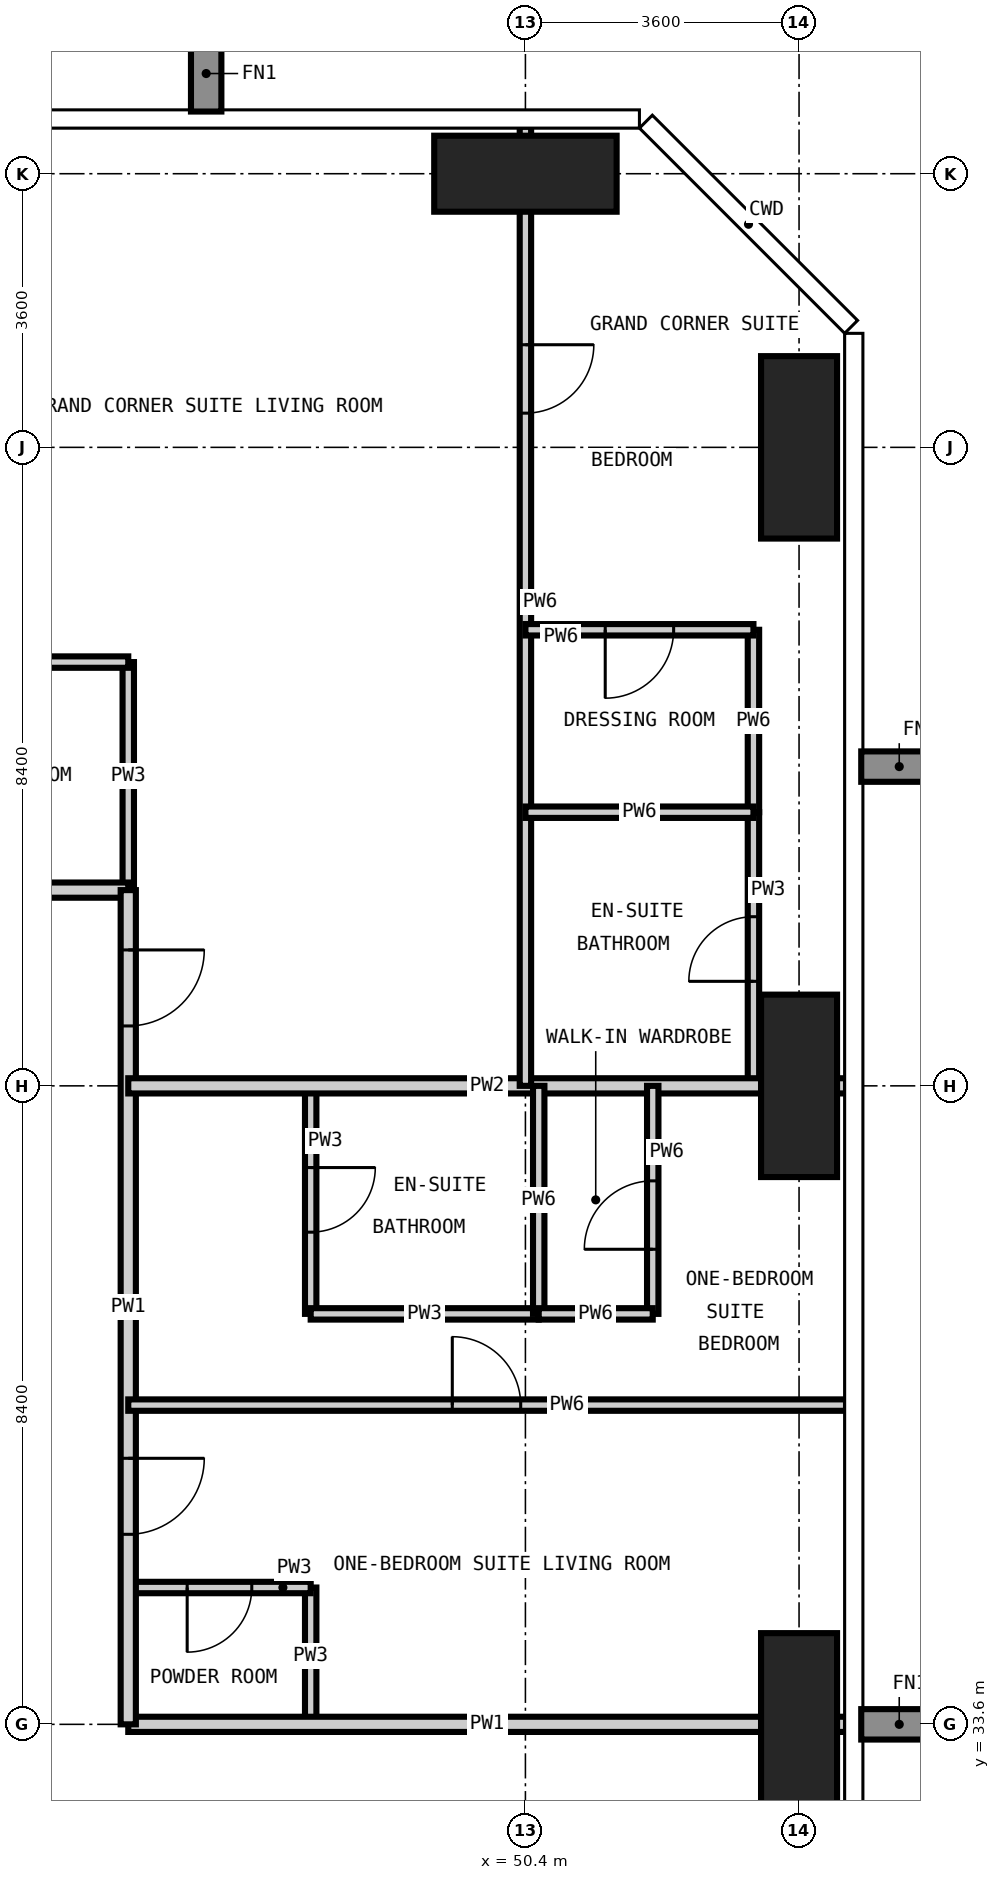
"""IFC4 building model, lengths in metres.
Left out: names, types, materials, properties, quantities, classifications, styles, units other than length and angle.
Written with IfcOpenShell. Run it as: python <this file> out.ifc"""

import sys

from ifc_helpers import new_model, si_unit, direction, frame, frame_2d, origin, origin_2d, place, context, subcontext, project, spatial, rectangle, extrude, element, fill, save


model = new_model("IFC4")
c1 = context("Model", 3, precision=1e-05, world=origin(), true_north=direction((0.0, 1.0)))
c2 = subcontext(c1, "Body", "Model", "MODEL_VIEW")
j1 = project(units=[si_unit("LENGTHUNIT", "METRE"), si_unit("PLANEANGLEUNIT", "RADIAN")], contexts=[c1])
p1 = place(None, origin())
s1 = spatial("IfcSite", under=j1, at=p1, CompositionType="ELEMENT")
p2 = place(p1, origin())
s2 = spatial("IfcBuilding", under=s1, at=p2, CompositionType="ELEMENT")
p3 = place(p2, frame((0.0, 0.0, 237.3)))
s3 = spatial("IfcBuildingStorey", under=s2, at=p3, CompositionType="ELEMENT", Elevation=237.3)
p4 = place(p3, frame((50.4, 54.0, -0.35), z_axis=(0.0, 0.0, 1.0), x_axis=(1.0, 0.0, 0.0)))
e1 = element("IfcColumn", 1, at=p4, inside=s3, PredefinedType="COLUMN", context=c2, shape_type="SweptSolid", body=[
    extrude(rectangle(XDim=2.4, YDim=1.0, at=origin_2d()), origin(), (0.0, 0.0, 1.0), 3.9),
])
for number, where, z_axis, x_axis in (
    (2, (54.0, 33.6, -0.35), (0.0, 0.0, 1.0), (1.0, 0.0, 0.0)),
    (3, (54.0, 42.0, -0.35), (0.0, 0.0, 1.0), (1.0, 0.0, 0.0)),
    (4, (54.0, 50.4, -0.35), (0.0, 0.0, 1.0), (1.0, 0.0, 0.0)),
):
    element("IfcColumn", number, at=place(p3, frame(where, z_axis=z_axis, x_axis=x_axis)), inside=s3, PredefinedType="COLUMN", context=c2, shape_type="SweptSolid", body=[
        extrude(rectangle(XDim=1.0, YDim=2.4, at=origin_2d()), origin(), (0.0, 0.0, 1.0), 3.9),
    ])
p5 = place(p3, frame((45.175, 44.575, 0.0), z_axis=(0.0, 0.0, 1.0), x_axis=(0.0, 1.0, 0.0)))
e5 = element("IfcWall", 5, at=p5, inside=s3, PredefinedType="PARTITIONING", context=c2, shape_type="SweptSolid", body=[
    extrude(rectangle(XDim=3.0, YDim=0.15, at=frame_2d((1.5, 0.0))), origin(), (0.0, 0.0, 1.0), 3.55),
])
p6 = place(p3, frame((47.575, 33.6, 0.0), z_axis=(0.0, 0.0, 1.0), x_axis=(0.0, 1.0, 0.0)))
e6 = element("IfcWall", 6, at=p6, inside=s3, PredefinedType="PARTITIONING", context=c2, shape_type="SweptSolid", body=[
    extrude(rectangle(XDim=1.8, YDim=0.15, at=frame_2d((0.9, 0.0))), origin(), (0.0, 0.0, 1.0), 3.55),
])
p7 = place(p3, frame((47.575, 39.0, 0.0), z_axis=(0.0, 0.0, 1.0), x_axis=(0.0, 1.0, 0.0)))
e7 = element("IfcWall", 7, at=p7, inside=s3, PredefinedType="PARTITIONING", context=c2, shape_type="SweptSolid", body=[
    extrude(rectangle(XDim=3.0, YDim=0.15, at=frame_2d((1.5, 0.0))), origin(), (0.0, 0.0, 1.0), 3.55),
])
p8 = place(p7, frame((1.075, 0.0, 0.0)))
e8 = element("IfcOpeningElement", 8, at=p8, cuts=e7, PredefinedType="OPENING", context=c2, shape_type="SweptSolid", body=[
    extrude(rectangle(XDim=0.85, YDim=2.1, at=frame_2d((0.425, 1.05))), frame((0.0, 0.085, 0.0), z_axis=(0.0, -1.0, 0.0), x_axis=(1.0, 0.0, 0.0)), (0.0, 0.0, 1.0), 0.17),
])
p9 = place(p3, frame((53.4, 42.0, 0.0), z_axis=(0.0, 0.0, 1.0), x_axis=(0.0, 1.0, 0.0)))
e9 = element("IfcWall", 9, at=p9, inside=s3, PredefinedType="PARTITIONING", context=c2, shape_type="SweptSolid", body=[
    extrude(rectangle(XDim=3.6, YDim=0.15, at=frame_2d((1.8, 0.0))), origin(), (0.0, 0.0, 1.0), 3.55),
])
p10 = place(p9, frame((1.375, 0.0, 0.0)))
e10 = element("IfcOpeningElement", 10, at=p10, cuts=e9, PredefinedType="OPENING", context=c2, shape_type="SweptSolid", body=[
    extrude(rectangle(XDim=0.85, YDim=2.1, at=frame_2d((0.425, 1.05))), frame((0.0, 0.085, 0.0), z_axis=(0.0, -1.0, 0.0), x_axis=(1.0, 0.0, 0.0)), (0.0, 0.0, 1.0), 0.17),
])
p11 = place(p3, frame((45.175, 35.4, 0.0), z_axis=(0.0, 0.0, 1.0), x_axis=(1.0, 0.0, 0.0)))
e11 = element("IfcWall", 11, at=p11, inside=s3, PredefinedType="PARTITIONING", context=c2, shape_type="SweptSolid", body=[
    extrude(rectangle(XDim=2.4, YDim=0.15, at=frame_2d((1.2, 0.0))), origin(), (0.0, 0.0, 1.0), 3.55),
])
p12 = place(p11, frame((0.775, 0.0, 0.0)))
e12 = element("IfcOpeningElement", 12, at=p12, cuts=e11, PredefinedType="OPENING", context=c2, shape_type="SweptSolid", body=[
    extrude(rectangle(XDim=0.85, YDim=2.1, at=frame_2d((0.425, 1.05))), frame((0.0, 0.085, 0.0), z_axis=(0.0, -1.0, 0.0), x_axis=(1.0, 0.0, 0.0)), (0.0, 0.0, 1.0), 0.17),
])
p13 = place(p3, frame((47.575, 39.0, 0.0), z_axis=(0.0, 0.0, 1.0), x_axis=(1.0, 0.0, 0.0)))
e13 = element("IfcWall", 13, at=p13, inside=s3, PredefinedType="PARTITIONING", context=c2, shape_type="SweptSolid", body=[
    extrude(rectangle(XDim=3.0, YDim=0.15, at=frame_2d((1.5, 0.0))), origin(), (0.0, 0.0, 1.0), 3.55),
])
p14 = place(p3, frame((42.0, 47.575, 0.0), z_axis=(0.0, 0.0, 1.0), x_axis=(1.0, 0.0, 0.0)))
e14 = element("IfcWall", 14, at=p14, inside=s3, PredefinedType="PARTITIONING", context=c2, shape_type="SweptSolid", body=[
    extrude(rectangle(XDim=3.175, YDim=0.15, at=frame_2d((1.587, 0.0))), origin(), (0.0, 0.0, 1.0), 3.55),
])
p15 = place(p14, frame((1.163, 0.0, 0.0)))
e15 = element("IfcOpeningElement", 15, at=p15, cuts=e14, PredefinedType="OPENING", context=c2, shape_type="SweptSolid", body=[
    extrude(rectangle(XDim=0.85, YDim=2.1, at=frame_2d((0.425, 1.05))), frame((0.0, 0.085, 0.0), z_axis=(0.0, -1.0, 0.0), x_axis=(1.0, 0.0, 0.0)), (0.0, 0.0, 1.0), 0.17),
])
p16 = place(p3, frame((45.175, 33.6, 0.0), z_axis=(0.0, 0.0, 1.0), x_axis=(1.0, 0.0, 0.0)))
e16 = element("IfcWall", 16, at=p16, inside=s3, PredefinedType="PARTITIONING", context=c2, shape_type="SweptSolid", body=[
    extrude(rectangle(XDim=9.443, YDim=0.2, at=frame_2d((4.721, 0.0))), origin(), (0.0, 0.0, 1.0), 3.55),
])
p17 = place(p3, frame((22.325, 44.575, 0.0), z_axis=(0.0, 0.0, 1.0), x_axis=(1.0, 0.0, 0.0)))
e17 = element("IfcWall", 17, at=p17, inside=s3, PredefinedType="PARTITIONING", context=c2, shape_type="SweptSolid", body=[
    extrude(rectangle(XDim=22.85, YDim=0.2, at=frame_2d((11.425, 0.0))), origin(), (0.0, 0.0, 1.0), 3.55),
])
p18 = place(p17, frame((6.575, 0.0, 0.0)))
e18 = element("IfcOpeningElement", 18, at=p18, cuts=e17, PredefinedType="OPENING", context=c2, shape_type="SweptSolid", body=[
    extrude(rectangle(XDim=1.0, YDim=2.2, at=frame_2d((0.5, 1.1))), frame((0.0, 0.11, 0.0), z_axis=(0.0, -1.0, 0.0), x_axis=(1.0, 0.0, 0.0)), (0.0, 0.0, 1.0), 0.22),
])
p19 = place(p17, frame((14.975, 0.0, 0.0)))
e19 = element("IfcOpeningElement", 19, at=p19, cuts=e17, PredefinedType="OPENING", context=c2, shape_type="SweptSolid", body=[
    extrude(rectangle(XDim=1.0, YDim=2.2, at=frame_2d((0.5, 1.1))), frame((0.0, 0.11, 0.0), z_axis=(0.0, -1.0, 0.0), x_axis=(1.0, 0.0, 0.0)), (0.0, 0.0, 1.0), 0.22),
])
p20 = place(p3, frame((45.175, 44.575, 0.0), z_axis=(0.0, 0.0, 1.0), x_axis=(0.0, -1.0, 0.0)))
e20 = element("IfcWall", 20, at=p20, inside=s3, PredefinedType="PARTITIONING", context=c2, shape_type="SweptSolid", body=[
    extrude(rectangle(XDim=10.975, YDim=0.2, at=frame_2d((5.487, 0.0))), origin(), (0.0, 0.0, 1.0), 3.55),
])
p21 = place(p20, frame((7.475, 0.0, 0.0)))
e21 = element("IfcOpeningElement", 21, at=p21, cuts=e20, PredefinedType="OPENING", context=c2, shape_type="SweptSolid", body=[
    extrude(rectangle(XDim=1.0, YDim=2.2, at=frame_2d((0.5, 1.1))), frame((0.0, 0.11, 0.0), z_axis=(0.0, -1.0, 0.0), x_axis=(1.0, 0.0, 0.0)), (0.0, 0.0, 1.0), 0.22),
])
p22 = place(p20, frame((0.787, 0.0, 0.0)))
e22 = element("IfcOpeningElement", 22, at=p22, cuts=e20, PredefinedType="OPENING", context=c2, shape_type="SweptSolid", body=[
    extrude(rectangle(XDim=1.0, YDim=2.2, at=frame_2d((0.5, 1.1))), frame((0.0, 0.11, 0.0), z_axis=(0.0, -1.0, 0.0), x_axis=(1.0, 0.0, 0.0)), (0.0, 0.0, 1.0), 0.22),
])
p23 = place(p3, frame((45.175, 42.0, 0.0), z_axis=(0.0, 0.0, 1.0), x_axis=(1.0, 0.0, 0.0)))
e23 = element("IfcWall", 23, at=p23, inside=s3, PredefinedType="PARTITIONING", context=c2, shape_type="SweptSolid", body=[
    extrude(rectangle(XDim=9.443, YDim=0.2, at=frame_2d((4.721, 0.0))), origin(), (0.0, 0.0, 1.0), 3.55),
])
p24 = place(p3, frame((50.4, 42.0, 0.0), z_axis=(0.0, 0.0, 1.0), x_axis=(0.0, 1.0, 0.0)))
e24 = element("IfcWall", 24, at=p24, inside=s3, PredefinedType="PARTITIONING", context=c2, shape_type="SweptSolid", body=[
    extrude(rectangle(XDim=12.618, YDim=0.15, at=frame_2d((6.309, 0.0))), origin(), (0.0, 0.0, 1.0), 3.55),
])
p25 = place(p24, frame((8.85, 0.0, 0.0)))
e25 = element("IfcOpeningElement", 25, at=p25, cuts=e24, PredefinedType="OPENING", context=c2, shape_type="SweptSolid", body=[
    extrude(rectangle(XDim=0.9, YDim=2.1, at=frame_2d((0.45, 1.05))), frame((0.0, 0.085, 0.0), z_axis=(0.0, -1.0, 0.0), x_axis=(1.0, 0.0, 0.0)), (0.0, 0.0, 1.0), 0.17),
])
p26 = place(p3, frame((50.575, 39.0, 0.0), z_axis=(0.0, 0.0, 1.0), x_axis=(0.0, 1.0, 0.0)))
e26 = element("IfcWall", 26, at=p26, inside=s3, PredefinedType="PARTITIONING", context=c2, shape_type="SweptSolid", body=[
    extrude(rectangle(XDim=3.0, YDim=0.15, at=frame_2d((1.5, 0.0))), origin(), (0.0, 0.0, 1.0), 3.55),
])
p27 = place(p3, frame((52.075, 39.0, 0.0), z_axis=(0.0, 0.0, 1.0), x_axis=(0.0, 1.0, 0.0)))
e27 = element("IfcWall", 27, at=p27, inside=s3, PredefinedType="PARTITIONING", context=c2, shape_type="SweptSolid", body=[
    extrude(rectangle(XDim=3.0, YDim=0.15, at=frame_2d((1.5, 0.0))), origin(), (0.0, 0.0, 1.0), 3.55),
])
p28 = place(p27, frame((0.85, 0.0, 0.0)))
e28 = element("IfcOpeningElement", 28, at=p28, cuts=e27, PredefinedType="OPENING", context=c2, shape_type="SweptSolid", body=[
    extrude(rectangle(XDim=0.9, YDim=2.1, at=frame_2d((0.45, 1.05))), frame((0.0, 0.085, 0.0), z_axis=(0.0, -1.0, 0.0), x_axis=(1.0, 0.0, 0.0)), (0.0, 0.0, 1.0), 0.17),
])
p29 = place(p3, frame((53.4, 45.6, 0.0), z_axis=(0.0, 0.0, 1.0), x_axis=(0.0, 1.0, 0.0)))
e29 = element("IfcWall", 29, at=p29, inside=s3, PredefinedType="PARTITIONING", context=c2, shape_type="SweptSolid", body=[
    extrude(rectangle(XDim=2.4, YDim=0.15, at=frame_2d((1.2, 0.0))), origin(), (0.0, 0.0, 1.0), 3.55),
])
p30 = place(p3, frame((45.175, 37.8, 0.0), z_axis=(0.0, 0.0, 1.0), x_axis=(1.0, 0.0, 0.0)))
e30 = element("IfcWall", 30, at=p30, inside=s3, PredefinedType="PARTITIONING", context=c2, shape_type="SweptSolid", body=[
    extrude(rectangle(XDim=9.443, YDim=0.15, at=frame_2d((4.721, 0.0))), origin(), (0.0, 0.0, 1.0), 3.55),
])
p31 = place(p30, frame((4.263, 0.0, 0.0)))
e31 = element("IfcOpeningElement", 31, at=p31, cuts=e30, PredefinedType="OPENING", context=c2, shape_type="SweptSolid", body=[
    extrude(rectangle(XDim=0.9, YDim=2.1, at=frame_2d((0.45, 1.05))), frame((0.0, 0.085, 0.0), z_axis=(0.0, -1.0, 0.0), x_axis=(1.0, 0.0, 0.0)), (0.0, 0.0, 1.0), 0.17),
])
p32 = place(p3, frame((50.575, 39.0, 0.0), z_axis=(0.0, 0.0, 1.0), x_axis=(1.0, 0.0, 0.0)))
e32 = element("IfcWall", 32, at=p32, inside=s3, PredefinedType="PARTITIONING", context=c2, shape_type="SweptSolid", body=[
    extrude(rectangle(XDim=1.5, YDim=0.15, at=frame_2d((0.75, 0.0))), origin(), (0.0, 0.0, 1.0), 3.55),
])
p33 = place(p3, frame((50.4, 45.6, 0.0), z_axis=(0.0, 0.0, 1.0), x_axis=(1.0, 0.0, 0.0)))
e33 = element("IfcWall", 33, at=p33, inside=s3, PredefinedType="PARTITIONING", context=c2, shape_type="SweptSolid", body=[
    extrude(rectangle(XDim=3.0, YDim=0.15, at=frame_2d((1.5, 0.0))), origin(), (0.0, 0.0, 1.0), 3.55),
])
p34 = place(p3, frame((50.4, 48.0, 0.0), z_axis=(0.0, 0.0, 1.0), x_axis=(1.0, 0.0, 0.0)))
e34 = element("IfcWall", 34, at=p34, inside=s3, PredefinedType="PARTITIONING", context=c2, shape_type="SweptSolid", body=[
    extrude(rectangle(XDim=3.0, YDim=0.15, at=frame_2d((1.5, 0.0))), origin(), (0.0, 0.0, 1.0), 3.55),
])
p35 = place(p34, frame((1.05, 0.0, 0.0)))
e35 = element("IfcOpeningElement", 35, at=p35, cuts=e34, PredefinedType="OPENING", context=c2, shape_type="SweptSolid", body=[
    extrude(rectangle(XDim=0.9, YDim=2.1, at=frame_2d((0.45, 1.05))), frame((0.0, 0.085, 0.0), z_axis=(0.0, -1.0, 0.0), x_axis=(1.0, 0.0, 0.0)), (0.0, 0.0, 1.0), 0.17),
])
p36 = place(p21, origin())
e36 = element("IfcDoor", 36, at=p36, inside=s3, OperationType="SINGLE_SWING_LEFT", PredefinedType="DOOR", context=c2, shape_type="SweptSolid", body=[
    extrude(rectangle(XDim=1.0, YDim=2.2, at=frame_2d((0.5, 1.1))), frame((0.0, 0.025, 0.0), z_axis=(0.0, -1.0, 0.0), x_axis=(1.0, 0.0, 0.0)), (0.0, 0.0, 1.0), 0.05),
])
fill(e21, e36)
p37 = place(p12, frame((0.85, 0.0, 0.0), z_axis=(0.0, 0.0, 1.0), x_axis=(-1.0, 0.0, 0.0)))
e37 = element("IfcDoor", 37, at=p37, inside=s3, OperationType="SINGLE_SWING_RIGHT", PredefinedType="DOOR", context=c2, shape_type="SweptSolid", body=[
    extrude(rectangle(XDim=0.85, YDim=2.1, at=frame_2d((0.425, 1.05))), frame((0.0, 0.025, 0.0), z_axis=(0.0, -1.0, 0.0), x_axis=(1.0, 0.0, 0.0)), (0.0, 0.0, 1.0), 0.05),
])
fill(e12, e37)
p38 = place(p31, origin())
e38 = element("IfcDoor", 38, at=p38, inside=s3, OperationType="SINGLE_SWING_LEFT", PredefinedType="DOOR", context=c2, shape_type="SweptSolid", body=[
    extrude(rectangle(XDim=0.9, YDim=2.1, at=frame_2d((0.45, 1.05))), frame((0.0, 0.025, 0.0), z_axis=(0.0, -1.0, 0.0), x_axis=(1.0, 0.0, 0.0)), (0.0, 0.0, 1.0), 0.05),
])
fill(e31, e38)
p39 = place(p8, frame((0.85, 0.0, 0.0), z_axis=(0.0, 0.0, 1.0), x_axis=(-1.0, 0.0, 0.0)))
e39 = element("IfcDoor", 39, at=p39, inside=s3, OperationType="SINGLE_SWING_LEFT", PredefinedType="DOOR", context=c2, shape_type="SweptSolid", body=[
    extrude(rectangle(XDim=0.85, YDim=2.1, at=frame_2d((0.425, 1.05))), frame((0.0, 0.025, 0.0), z_axis=(0.0, -1.0, 0.0), x_axis=(1.0, 0.0, 0.0)), (0.0, 0.0, 1.0), 0.05),
])
fill(e8, e39)
p40 = place(p28, origin())
e40 = element("IfcDoor", 40, at=p40, inside=s3, OperationType="SINGLE_SWING_LEFT", PredefinedType="DOOR", context=c2, shape_type="SweptSolid", body=[
    extrude(rectangle(XDim=0.9, YDim=2.1, at=frame_2d((0.45, 1.05))), frame((0.0, 0.025, 0.0), z_axis=(0.0, -1.0, 0.0), x_axis=(1.0, 0.0, 0.0)), (0.0, 0.0, 1.0), 0.05),
])
fill(e28, e40)
p41 = place(p22, origin())
e41 = element("IfcDoor", 41, at=p41, inside=s3, OperationType="SINGLE_SWING_LEFT", PredefinedType="DOOR", context=c2, shape_type="SweptSolid", body=[
    extrude(rectangle(XDim=1.0, YDim=2.2, at=frame_2d((0.5, 1.1))), frame((0.0, 0.025, 0.0), z_axis=(0.0, -1.0, 0.0), x_axis=(1.0, 0.0, 0.0)), (0.0, 0.0, 1.0), 0.05),
])
fill(e22, e41)
p42 = place(p25, frame((0.9, 0.0, 0.0), z_axis=(0.0, 0.0, 1.0), x_axis=(-1.0, 0.0, 0.0)))
e42 = element("IfcDoor", 42, at=p42, inside=s3, OperationType="SINGLE_SWING_LEFT", PredefinedType="DOOR", context=c2, shape_type="SweptSolid", body=[
    extrude(rectangle(XDim=0.9, YDim=2.1, at=frame_2d((0.45, 1.05))), frame((0.0, 0.025, 0.0), z_axis=(0.0, -1.0, 0.0), x_axis=(1.0, 0.0, 0.0)), (0.0, 0.0, 1.0), 0.05),
])
fill(e25, e42)
p43 = place(p10, origin())
e43 = element("IfcDoor", 43, at=p43, inside=s3, OperationType="SINGLE_SWING_LEFT", PredefinedType="DOOR", context=c2, shape_type="SweptSolid", body=[
    extrude(rectangle(XDim=0.85, YDim=2.1, at=frame_2d((0.425, 1.05))), frame((0.0, 0.025, 0.0), z_axis=(0.0, -1.0, 0.0), x_axis=(1.0, 0.0, 0.0)), (0.0, 0.0, 1.0), 0.05),
])
fill(e10, e43)
p44 = place(p35, frame((0.9, 0.0, 0.0), z_axis=(0.0, 0.0, 1.0), x_axis=(-1.0, 0.0, 0.0)))
e44 = element("IfcDoor", 44, at=p44, inside=s3, OperationType="SINGLE_SWING_RIGHT", PredefinedType="DOOR", context=c2, shape_type="SweptSolid", body=[
    extrude(rectangle(XDim=0.9, YDim=2.1, at=frame_2d((0.45, 1.05))), frame((0.0, 0.025, 0.0), z_axis=(0.0, -1.0, 0.0), x_axis=(1.0, 0.0, 0.0)), (0.0, 0.0, 1.0), 0.05),
])
fill(e35, e44)
save(model, sys.argv[1])
